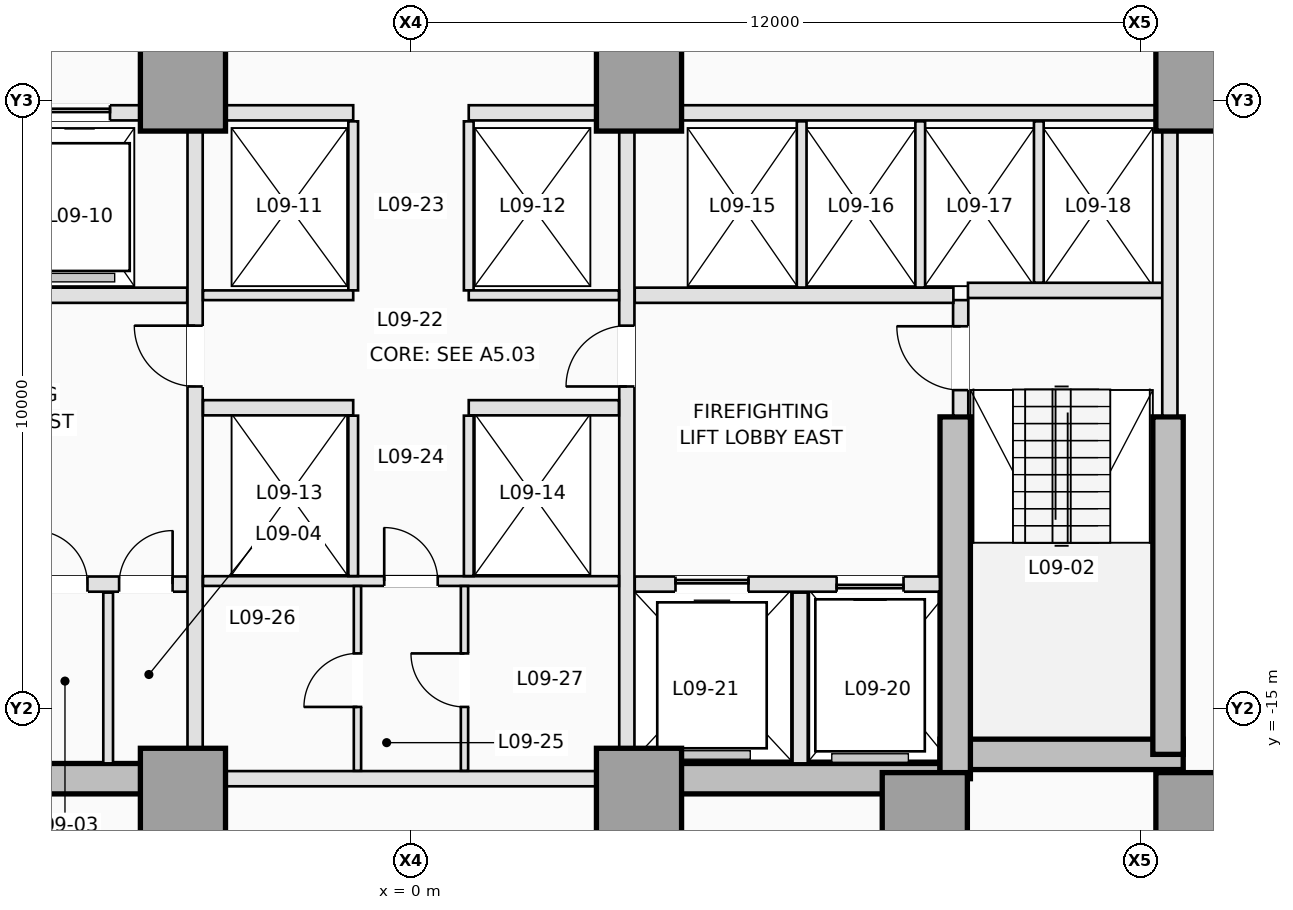
"""IFC4 building model, lengths in metres.
Left out: names, types, materials, properties, quantities, classifications, styles, units other than length and angle.
Written with IfcOpenShell. Run it as: python <this file> out.ifc"""

import sys

from ifc_helpers import new_model, si_unit, direction, frame, frame_2d, origin, origin_2d, place, context, subcontext, project, spatial, rectangle, extrude, element, fill, save


model = new_model("IFC4")
c1 = context("Model", 3, precision=1e-05, world=origin(), true_north=direction((0.0, 1.0)))
c2 = subcontext(c1, "Body", "Model", "MODEL_VIEW")
j1 = project(units=[si_unit("LENGTHUNIT", "METRE"), si_unit("PLANEANGLEUNIT", "RADIAN")], contexts=[c1])
p1 = place(None, origin())
s1 = spatial("IfcSite", under=j1, at=p1, CompositionType="ELEMENT")
p2 = place(p1, origin())
s2 = spatial("IfcBuilding", under=s1, at=p2, CompositionType="ELEMENT")
p3 = place(p2, frame((0.0, 0.0, 38.1)))
s3 = spatial("IfcBuildingStorey", under=s2, at=p3, CompositionType="ELEMENT", Elevation=38.1)
for number, where, z_axis, x_axis in (
    (1, (-8.95, -16.15, 0.0), (0.0, 0.0, 1.0), (1.0, 0.0, 0.0)),
    (2, (3.75, -16.15, 0.0), (0.0, 0.0, 1.0), (1.0, 0.0, 0.0)),
):
    element("IfcWall", number, at=place(p3, frame(where, z_axis=z_axis, x_axis=x_axis)), inside=s3, PredefinedType="SHEAR", context=c2, shape_type="SweptSolid", body=[
        extrude(rectangle(XDim=5.2, YDim=0.5, at=frame_2d((2.6, 0.0))), origin(), (0.0, 0.0, 1.0), 3.5),
    ])
p4 = place(p3, frame((8.7, -15.75, 0.0), z_axis=(0.0, 0.0, 1.0), x_axis=(1.0, 0.0, 0.0)))
e3 = element("IfcWall", 3, at=p4, inside=s3, PredefinedType="SHEAR", context=c2, shape_type="SweptSolid", body=[
    extrude(rectangle(XDim=4.0, YDim=0.5, at=frame_2d((2.0, 0.0))), origin(), (0.0, 0.0, 1.0), 3.5),
])
p5 = place(p3, frame((12.45, -15.75, 0.0), z_axis=(0.0, 0.0, 1.0), x_axis=(0.0, 1.0, 0.0)))
e4 = element("IfcWall", 4, at=p5, inside=s3, PredefinedType="SHEAR", context=c2, shape_type="SweptSolid", body=[
    extrude(rectangle(XDim=5.55, YDim=0.5, at=frame_2d((2.775, 0.0))), origin(), (0.0, 0.0, 1.0), 3.5),
])
p6 = place(p3, frame((8.95, -16.15, 0.0), z_axis=(0.0, 0.0, 1.0), x_axis=(0.0, 1.0, 0.0)))
e5 = element("IfcWall", 5, at=p6, inside=s3, PredefinedType="SHEAR", context=c2, shape_type="SweptSolid", body=[
    extrude(rectangle(XDim=5.95, YDim=0.5, at=frame_2d((2.975, 0.0))), origin(), (0.0, 0.0, 1.0), 3.5),
])
for number, where, z_axis, x_axis in (
    (6, (-3.75, -16.35, 0.0), (0.0, 0.0, 1.0), (1.0, 0.0, 0.0)),
    (7, (3.75, -16.35, 0.0), (0.0, 0.0, 1.0), (1.0, 0.0, 0.0)),
    (8, (8.45, -16.75, 0.0), (0.0, 0.0, 1.0), (1.0, 0.0, 0.0)),
    (9, (12.95, -16.75, 0.0), (0.0, 0.0, 1.0), (1.0, 0.0, 0.0)),
    (10, (-3.75, -4.8, 0.0), (0.0, 0.0, 1.0), (1.0, 0.0, 0.0)),
    (11, (3.75, -4.8, 0.0), (0.0, 0.0, 1.0), (1.0, 0.0, 0.0)),
    (12, (12.95, -4.8, 0.0), (0.0, 0.0, 1.0), (1.0, 0.0, 0.0)),
):
    element("IfcColumn", number, at=place(p3, frame(where, z_axis=z_axis, x_axis=x_axis)), inside=s3, PredefinedType="COLUMN", context=c2, shape_type="SweptSolid", body=[
        extrude(rectangle(XDim=1.4, YDim=1.4, at=origin_2d()), origin(), (0.0, 0.0, 1.0), 3.5),
    ])
p7 = place(p3, frame((9.04, -10.18, 0.0), z_axis=(0.0, 0.0, 1.0), x_axis=(0.0, 1.0, 0.0)))
e13 = element("IfcWall", 13, at=p7, inside=s3, PredefinedType="PARTITIONING", context=c2, shape_type="SweptSolid", body=[
    extrude(rectangle(XDim=1.9, YDim=0.25, at=frame_2d((0.95, 0.0))), origin(), (0.0, 0.0, 1.0), 3.25),
])
p8 = place(p7, frame((0.42, 0.0, 0.0)))
e14 = element("IfcOpeningElement", 14, at=p8, cuts=e13, PredefinedType="OPENING", context=c2, shape_type="SweptSolid", body=[
    extrude(rectangle(XDim=1.05, YDim=2.15, at=frame_2d((0.525, 1.075))), frame((0.0, 0.135, 0.0), z_axis=(0.0, -1.0, 0.0), x_axis=(1.0, 0.0, 0.0)), (0.0, 0.0, 1.0), 0.27),
])
p9 = place(p3, frame((9.16, -8.12, 0.0), z_axis=(0.0, 0.0, 1.0), x_axis=(1.0, 0.0, 0.0)))
e15 = element("IfcWall", 15, at=p9, inside=s3, PredefinedType="PARTITIONING", context=c2, shape_type="SweptSolid", body=[
    extrude(rectangle(XDim=3.22, YDim=0.25, at=frame_2d((1.61, 0.0))), origin(), (0.0, 0.0, 1.0), 3.25),
])
p10 = place(p3, frame((12.48, -10.18, 0.0), z_axis=(0.0, 0.0, 1.0), x_axis=(0.0, 1.0, 0.0)))
e16 = element("IfcWall", 16, at=p10, inside=s3, PredefinedType="PARTITIONING", context=c2, shape_type="SweptSolid", body=[
    extrude(rectangle(XDim=4.678, YDim=0.25, at=frame_2d((2.339, 0.0))), origin(), (0.0, 0.0, 1.0), 3.25),
])
p11 = place(p3, frame((-8.698, -12.95, 0.0), z_axis=(0.0, 0.0, 1.0), x_axis=(1.0, 0.0, 0.0)))
e17 = element("IfcWall", 17, at=p11, inside=s3, PredefinedType="PARTITIONING", context=c2, shape_type="SweptSolid", body=[
    extrude(rectangle(XDim=5.018, YDim=0.25, at=frame_2d((2.509, 0.0))), origin(), (0.0, 0.0, 1.0), 3.25),
])
p12 = place(p11, frame((0.598, 0.0, 0.0)))
e18 = element("IfcOpeningElement", 18, at=p12, cuts=e17, PredefinedType="OPENING", context=c2, shape_type="SweptSolid", body=[
    extrude(rectangle(XDim=1.1, YDim=2.15, at=frame_2d((0.55, 1.075))), frame((0.0, 0.135, 0.0), z_axis=(0.0, -1.0, 0.0), x_axis=(1.0, 0.0, 0.0)), (0.0, 0.0, 1.0), 0.27),
])
p13 = place(p11, frame((2.498, 0.0, 0.0)))
e19 = element("IfcOpeningElement", 19, at=p13, cuts=e17, PredefinedType="OPENING", context=c2, shape_type="SweptSolid", body=[
    extrude(rectangle(XDim=0.88, YDim=2.1, at=frame_2d((0.44, 1.05))), frame((0.0, 0.135, 0.0), z_axis=(0.0, -1.0, 0.0), x_axis=(1.0, 0.0, 0.0)), (0.0, 0.0, 1.0), 0.27),
])
p14 = place(p11, frame((3.898, 0.0, 0.0)))
e20 = element("IfcOpeningElement", 20, at=p14, cuts=e17, PredefinedType="OPENING", context=c2, shape_type="SweptSolid", body=[
    extrude(rectangle(XDim=0.88, YDim=2.1, at=frame_2d((0.44, 1.05))), frame((0.0, 0.135, 0.0), z_axis=(0.0, -1.0, 0.0), x_axis=(1.0, 0.0, 0.0)), (0.0, 0.0, 1.0), 0.27),
])
p15 = place(p3, frame((3.68, -12.95, 0.0), z_axis=(0.0, 0.0, 1.0), x_axis=(1.0, 0.0, 0.0)))
e21 = element("IfcWall", 21, at=p15, inside=s3, PredefinedType="PARTITIONING", context=c2, shape_type="SweptSolid", body=[
    extrude(rectangle(XDim=5.018, YDim=0.25, at=frame_2d((2.509, 0.0))), origin(), (0.0, 0.0, 1.0), 3.25),
])
p16 = place(p15, frame((3.32, 0.0, 0.0)))
e22 = element("IfcOpeningElement", 22, at=p16, cuts=e21, PredefinedType="OPENING", context=c2, shape_type="SweptSolid", body=[
    extrude(rectangle(XDim=1.1, YDim=2.15, at=frame_2d((0.55, 1.075))), frame((0.0, 0.135, 0.0), z_axis=(0.0, -1.0, 0.0), x_axis=(1.0, 0.0, 0.0)), (0.0, 0.0, 1.0), 0.27),
])
p17 = place(p15, frame((0.67, 0.0, 0.0)))
e23 = element("IfcOpeningElement", 23, at=p17, cuts=e21, PredefinedType="OPENING", context=c2, shape_type="SweptSolid", body=[
    extrude(rectangle(XDim=1.2, YDim=2.15, at=frame_2d((0.6, 1.075))), frame((0.0, 0.135, 0.0), z_axis=(0.0, -1.0, 0.0), x_axis=(1.0, 0.0, 0.0)), (0.0, 0.0, 1.0), 0.27),
])
p18 = place(p3, frame((-4.98, -15.898, 0.0), z_axis=(0.0, 0.0, 1.0), x_axis=(0.0, 1.0, 0.0)))
e24 = element("IfcWall", 24, at=p18, inside=s3, PredefinedType="PARTITIONING", context=c2, shape_type="SweptSolid", body=[
    extrude(rectangle(XDim=2.808, YDim=0.16, at=frame_2d((1.404, 0.0))), origin(), (0.0, 0.0, 1.0), 3.25),
])
p19 = place(p3, frame((6.4, -15.898, 0.0), z_axis=(0.0, 0.0, 1.0), x_axis=(0.0, 1.0, 0.0)))
e25 = element("IfcWall", 25, at=p19, inside=s3, PredefinedType="PARTITIONING", context=c2, shape_type="SweptSolid", body=[
    extrude(rectangle(XDim=2.808, YDim=0.25, at=frame_2d((1.404, 0.0))), origin(), (0.0, 0.0, 1.0), 3.25),
])
for number, where, z_axis, x_axis in (
    (26, (-8.92, -8.2, 0.0), (0.0, 0.0, 1.0), (1.0, 0.0, 0.0)),
    (27, (3.68, -8.2, 0.0), (0.0, 0.0, 1.0), (1.0, 0.0, 0.0)),
):
    element("IfcWall", number, at=place(p3, frame(where, z_axis=z_axis, x_axis=x_axis)), inside=s3, PredefinedType="PARTITIONING", context=c2, shape_type="SweptSolid", body=[
        extrude(rectangle(XDim=5.24, YDim=0.25, at=frame_2d((2.62, 0.0))), origin(), (0.0, 0.0, 1.0), 3.25),
    ])
p20 = place(p3, frame((-3.55, -15.648, 0.0), z_axis=(0.0, 0.0, 1.0), x_axis=(0.0, 1.0, 0.0)))
e28 = element("IfcWall", 28, at=p20, inside=s3, PredefinedType="PARTITIONING", context=c2, shape_type="SweptSolid", body=[
    extrude(rectangle(XDim=10.146, YDim=0.25, at=frame_2d((5.073, 0.0))), origin(), (0.0, 0.0, 1.0), 3.25),
])
p21 = place(p20, frame((5.948, 0.0, 0.0)))
e29 = element("IfcOpeningElement", 29, at=p21, cuts=e28, PredefinedType="OPENING", context=c2, shape_type="SweptSolid", body=[
    extrude(rectangle(XDim=1.0, YDim=2.15, at=frame_2d((0.5, 1.075))), frame((0.0, 0.135, 0.0), z_axis=(0.0, -1.0, 0.0), x_axis=(1.0, 0.0, 0.0)), (0.0, 0.0, 1.0), 0.27),
])
p22 = place(p3, frame((3.55, -15.648, 0.0), z_axis=(0.0, 0.0, 1.0), x_axis=(0.0, 1.0, 0.0)))
e30 = element("IfcWall", 30, at=p22, inside=s3, PredefinedType="PARTITIONING", context=c2, shape_type="SweptSolid", body=[
    extrude(rectangle(XDim=10.146, YDim=0.25, at=frame_2d((5.073, 0.0))), origin(), (0.0, 0.0, 1.0), 3.25),
])
p23 = place(p22, frame((5.948, 0.0, 0.0)))
e31 = element("IfcOpeningElement", 31, at=p23, cuts=e30, PredefinedType="OPENING", context=c2, shape_type="SweptSolid", body=[
    extrude(rectangle(XDim=1.0, YDim=2.15, at=frame_2d((0.5, 1.075))), frame((0.0, 0.135, 0.0), z_axis=(0.0, -1.0, 0.0), x_axis=(1.0, 0.0, 0.0)), (0.0, 0.0, 1.0), 0.27),
])
p24 = place(p3, frame((-12.248, -5.2, 0.0), z_axis=(0.0, 0.0, 1.0), x_axis=(1.0, 0.0, 0.0)))
e32 = element("IfcWall", 32, at=p24, inside=s3, PredefinedType="PARTITIONING", context=c2, shape_type="SweptSolid", body=[
    extrude(rectangle(XDim=7.796, YDim=0.25, at=frame_2d((3.898, 0.0))), origin(), (0.0, 0.0, 1.0), 3.25),
])
p25 = place(p24, frame((0.448, 0.0, 0.0)))
e33 = element("IfcOpeningElement", 33, at=p25, cuts=e32, PredefinedType="OPENING", context=c2, shape_type="SweptSolid", body=[
    extrude(rectangle(XDim=1.0, YDim=2.15, at=frame_2d((0.5, 1.075))), frame((0.0, 0.135, 0.0), z_axis=(0.0, -1.0, 0.0), x_axis=(1.0, 0.0, 0.0)), (0.0, 0.0, 1.0), 0.27),
])
p26 = place(p24, frame((2.398, 0.0, 0.0)))
e34 = element("IfcOpeningElement", 34, at=p26, cuts=e32, PredefinedType="OPENING", context=c2, shape_type="SweptSolid", body=[
    extrude(rectangle(XDim=1.0, YDim=2.15, at=frame_2d((0.5, 1.075))), frame((0.0, 0.135, 0.0), z_axis=(0.0, -1.0, 0.0), x_axis=(1.0, 0.0, 0.0)), (0.0, 0.0, 1.0), 0.27),
])
p27 = place(p24, frame((4.348, 0.0, 0.0)))
e35 = element("IfcOpeningElement", 35, at=p27, cuts=e32, PredefinedType="OPENING", context=c2, shape_type="SweptSolid", body=[
    extrude(rectangle(XDim=1.0, YDim=2.15, at=frame_2d((0.5, 1.075))), frame((0.0, 0.135, 0.0), z_axis=(0.0, -1.0, 0.0), x_axis=(1.0, 0.0, 0.0)), (0.0, 0.0, 1.0), 0.27),
])
p28 = place(p24, frame((6.298, 0.0, 0.0)))
e36 = element("IfcOpeningElement", 36, at=p28, cuts=e32, PredefinedType="OPENING", context=c2, shape_type="SweptSolid", body=[
    extrude(rectangle(XDim=1.0, YDim=2.15, at=frame_2d((0.5, 1.075))), frame((0.0, 0.135, 0.0), z_axis=(0.0, -1.0, 0.0), x_axis=(1.0, 0.0, 0.0)), (0.0, 0.0, 1.0), 0.27),
])
p29 = place(p3, frame((4.452, -5.2, 0.0), z_axis=(0.0, 0.0, 1.0), x_axis=(1.0, 0.0, 0.0)))
e37 = element("IfcWall", 37, at=p29, inside=s3, PredefinedType="PARTITIONING", context=c2, shape_type="SweptSolid", body=[
    extrude(rectangle(XDim=7.796, YDim=0.25, at=frame_2d((3.898, 0.0))), origin(), (0.0, 0.0, 1.0), 3.25),
])
for number, where, z_axis, x_axis in (
    (38, (-3.048, -5.2, 0.0), (0.0, 0.0, 1.0), (1.0, 0.0, 0.0)),
    (39, (0.95, -5.2, 0.0), (0.0, 0.0, 1.0), (1.0, 0.0, 0.0)),
):
    element("IfcWall", number, at=place(p3, frame(where, z_axis=z_axis, x_axis=x_axis)), inside=s3, PredefinedType="PARTITIONING", context=c2, shape_type="SweptSolid", body=[
        extrude(rectangle(XDim=2.098, YDim=0.25, at=frame_2d((1.049, 0.0))), origin(), (0.0, 0.0, 1.0), 3.25),
    ])
for number, where, z_axis, x_axis in (
    (40, (6.425, -8.073, 0.0), (0.0, 0.0, 1.0), (0.0, 1.0, 0.0)),
    (41, (8.375, -8.073, 0.0), (0.0, 0.0, 1.0), (0.0, 1.0, 0.0)),
):
    element("IfcWall", number, at=place(p3, frame(where, z_axis=z_axis, x_axis=x_axis)), inside=s3, PredefinedType="PARTITIONING", context=c2, shape_type="SweptSolid", body=[
        extrude(rectangle(XDim=2.733, YDim=0.16, at=frame_2d((1.366, 0.0))), origin(), (0.0, 0.0, 1.0), 3.25),
    ])
p30 = place(p3, frame((10.325, -7.993, 0.0), z_axis=(0.0, 0.0, 1.0), x_axis=(0.0, 1.0, 0.0)))
e42 = element("IfcWall", 42, at=p30, inside=s3, PredefinedType="PARTITIONING", context=c2, shape_type="SweptSolid", body=[
    extrude(rectangle(XDim=2.653, YDim=0.16, at=frame_2d((1.326, 0.0))), origin(), (0.0, 0.0, 1.0), 3.25),
])
p31 = place(p3, frame((-3.048, -16.15, 0.0), z_axis=(0.0, 0.0, 1.0), x_axis=(1.0, 0.0, 0.0)))
e43 = element("IfcWall", 43, at=p31, inside=s3, PredefinedType="PARTITIONING", context=c2, shape_type="SweptSolid", body=[
    extrude(rectangle(XDim=6.096, YDim=0.25, at=frame_2d((3.048, 0.0))), origin(), (0.0, 0.0, 1.0), 2.3),
])
for number, where, z_axis, x_axis in (
    (44, (-0.95, -8.12, 0.0), (0.0, 0.0, 1.0), (0.0, 1.0, 0.0)),
    (45, (0.95, -8.12, 0.0), (0.0, 0.0, 1.0), (0.0, 1.0, 0.0)),
):
    element("IfcWall", number, at=place(p3, frame(where, z_axis=z_axis, x_axis=x_axis)), inside=s3, PredefinedType="PARTITIONING", context=c2, shape_type="SweptSolid", body=[
        extrude(rectangle(XDim=2.78, YDim=0.16, at=frame_2d((1.39, 0.0))), origin(), (0.0, 0.0, 1.0), 3.25),
    ])
for number, where, z_axis, x_axis in (
    (46, (-3.42, -8.2, 0.0), (0.0, 0.0, 1.0), (1.0, 0.0, 0.0)),
    (47, (0.95, -8.2, 0.0), (0.0, 0.0, 1.0), (1.0, 0.0, 0.0)),
):
    element("IfcWall", number, at=place(p3, frame(where, z_axis=z_axis, x_axis=x_axis)), inside=s3, PredefinedType="PARTITIONING", context=c2, shape_type="SweptSolid", body=[
        extrude(rectangle(XDim=2.47, YDim=0.16, at=frame_2d((1.235, 0.0))), origin(), (0.0, 0.0, 1.0), 3.25),
    ])
for number, where, z_axis, x_axis in (
    (48, (-3.42, -10.05, 0.0), (0.0, 0.0, 1.0), (1.0, 0.0, 0.0)),
    (49, (0.95, -10.05, 0.0), (0.0, 0.0, 1.0), (1.0, 0.0, 0.0)),
):
    element("IfcWall", number, at=place(p3, frame(where, z_axis=z_axis, x_axis=x_axis)), inside=s3, PredefinedType="PARTITIONING", context=c2, shape_type="SweptSolid", body=[
        extrude(rectangle(XDim=2.47, YDim=0.25, at=frame_2d((1.235, 0.0))), origin(), (0.0, 0.0, 1.0), 3.25),
    ])
p32 = place(p3, frame((-3.42, -12.9, 0.0), z_axis=(0.0, 0.0, 1.0), x_axis=(1.0, 0.0, 0.0)))
e50 = element("IfcWall", 50, at=p32, inside=s3, PredefinedType="PARTITIONING", context=c2, shape_type="SweptSolid", body=[
    extrude(rectangle(XDim=6.84, YDim=0.16, at=frame_2d((3.42, 0.0))), origin(), (0.0, 0.0, 1.0), 3.25),
])
p33 = place(p32, frame((2.98, 0.0, 0.0)))
e51 = element("IfcOpeningElement", 51, at=p33, cuts=e50, PredefinedType="OPENING", context=c2, shape_type="SweptSolid", body=[
    extrude(rectangle(XDim=0.88, YDim=2.12, at=frame_2d((0.44, 1.06))), frame((0.0, 0.09, 0.0), z_axis=(0.0, -1.0, 0.0), x_axis=(1.0, 0.0, 0.0)), (0.0, 0.0, 1.0), 0.18),
])
for number, where, z_axis, x_axis in (
    (52, (-0.95, -12.818, 0.0), (0.0, 0.0, 1.0), (0.0, 1.0, 0.0)),
    (53, (0.95, -12.818, 0.0), (0.0, 0.0, 1.0), (0.0, 1.0, 0.0)),
):
    element("IfcWall", number, at=place(p3, frame(where, z_axis=z_axis, x_axis=x_axis)), inside=s3, PredefinedType="PARTITIONING", context=c2, shape_type="SweptSolid", body=[
        extrude(rectangle(XDim=2.638, YDim=0.16, at=frame_2d((1.319, 0.0))), origin(), (0.0, 0.0, 1.0), 3.25),
    ])
p34 = place(p3, frame((-0.88, -16.02, 0.0), z_axis=(0.0, 0.0, 1.0), x_axis=(0.0, 1.0, 0.0)))
e54 = element("IfcWall", 54, at=p34, inside=s3, PredefinedType="PARTITIONING", context=c2, shape_type="SweptSolid", body=[
    extrude(rectangle(XDim=3.038, YDim=0.12, at=frame_2d((1.519, 0.0))), origin(), (0.0, 0.0, 1.0), 3.25),
])
p35 = place(p34, frame((1.05, 0.0, 0.0)))
e55 = element("IfcOpeningElement", 55, at=p35, cuts=e54, PredefinedType="OPENING", context=c2, shape_type="SweptSolid", body=[
    extrude(rectangle(XDim=0.88, YDim=2.12, at=frame_2d((0.44, 1.06))), frame((0.0, 0.07, 0.0), z_axis=(0.0, -1.0, 0.0), x_axis=(1.0, 0.0, 0.0)), (0.0, 0.0, 1.0), 0.14),
])
p36 = place(p3, frame((0.88, -16.02, 0.0), z_axis=(0.0, 0.0, 1.0), x_axis=(0.0, 1.0, 0.0)))
e56 = element("IfcWall", 56, at=p36, inside=s3, PredefinedType="PARTITIONING", context=c2, shape_type="SweptSolid", body=[
    extrude(rectangle(XDim=3.038, YDim=0.12, at=frame_2d((1.519, 0.0))), origin(), (0.0, 0.0, 1.0), 3.25),
])
p37 = place(p36, frame((1.05, 0.0, 0.0)))
e57 = element("IfcOpeningElement", 57, at=p37, cuts=e56, PredefinedType="OPENING", context=c2, shape_type="SweptSolid", body=[
    extrude(rectangle(XDim=0.88, YDim=2.12, at=frame_2d((0.44, 1.06))), frame((0.0, 0.07, 0.0), z_axis=(0.0, -1.0, 0.0), x_axis=(1.0, 0.0, 0.0)), (0.0, 0.0, 1.0), 0.14),
])
p38 = place(p28, origin())
e58 = element("IfcDoor", 58, at=p38, inside=s3, OperationType="SLIDING_TO_LEFT", PredefinedType="DOOR", context=c2, shape_type="SweptSolid", body=[
    extrude(rectangle(XDim=1.0, YDim=2.15, at=frame_2d((0.5, 1.075))), frame((0.0, 0.025, 0.0), z_axis=(0.0, -1.0, 0.0), x_axis=(1.0, 0.0, 0.0)), (0.0, 0.0, 1.0), 0.05),
])
fill(e36, e58)
p39 = place(p16, origin())
e59 = element("IfcDoor", 59, at=p39, inside=s3, OperationType="SLIDING_TO_RIGHT", PredefinedType="DOOR", context=c2, shape_type="SweptSolid", body=[
    extrude(rectangle(XDim=1.1, YDim=2.15, at=frame_2d((0.55, 1.075))), frame((0.0, 0.025, 0.0), z_axis=(0.0, -1.0, 0.0), x_axis=(1.0, 0.0, 0.0)), (0.0, 0.0, 1.0), 0.05),
])
fill(e22, e59)
p40 = place(p17, origin())
e60 = element("IfcDoor", 60, at=p40, inside=s3, OperationType="SLIDING_TO_LEFT", PredefinedType="DOOR", context=c2, shape_type="SweptSolid", body=[
    extrude(rectangle(XDim=1.2, YDim=2.15, at=frame_2d((0.6, 1.075))), frame((0.0, 0.025, 0.0), z_axis=(0.0, -1.0, 0.0), x_axis=(1.0, 0.0, 0.0)), (0.0, 0.0, 1.0), 0.05),
])
fill(e23, e60)
p41 = place(p8, origin())
e61 = element("IfcDoor", 61, at=p41, inside=s3, OperationType="SINGLE_SWING_RIGHT", PredefinedType="DOOR", context=c2, shape_type="SweptSolid", body=[
    extrude(rectangle(XDim=1.05, YDim=2.15, at=frame_2d((0.525, 1.075))), frame((0.0, 0.025, 0.0), z_axis=(0.0, -1.0, 0.0), x_axis=(1.0, 0.0, 0.0)), (0.0, 0.0, 1.0), 0.05),
])
fill(e14, e61)
p42 = place(p13, origin())
e62 = element("IfcDoor", 62, at=p42, inside=s3, OperationType="SINGLE_SWING_LEFT", PredefinedType="TRAPDOOR", context=c2, shape_type="SweptSolid", body=[
    extrude(rectangle(XDim=0.88, YDim=2.1, at=frame_2d((0.44, 1.05))), frame((0.0, 0.025, 0.0), z_axis=(0.0, -1.0, 0.0), x_axis=(1.0, 0.0, 0.0)), (0.0, 0.0, 1.0), 0.05),
])
fill(e19, e62)
p43 = place(p14, origin())
e63 = element("IfcDoor", 63, at=p43, inside=s3, OperationType="SINGLE_SWING_RIGHT", PredefinedType="TRAPDOOR", context=c2, shape_type="SweptSolid", body=[
    extrude(rectangle(XDim=0.88, YDim=2.1, at=frame_2d((0.44, 1.05))), frame((0.0, 0.025, 0.0), z_axis=(0.0, -1.0, 0.0), x_axis=(1.0, 0.0, 0.0)), (0.0, 0.0, 1.0), 0.05),
])
fill(e20, e63)
p44 = place(p21, origin())
e64 = element("IfcDoor", 64, at=p44, inside=s3, OperationType="SINGLE_SWING_RIGHT", PredefinedType="DOOR", context=c2, shape_type="SweptSolid", body=[
    extrude(rectangle(XDim=1.0, YDim=2.15, at=frame_2d((0.5, 1.075))), frame((0.0, 0.025, 0.0), z_axis=(0.0, -1.0, 0.0), x_axis=(1.0, 0.0, 0.0)), (0.0, 0.0, 1.0), 0.05),
])
fill(e29, e64)
p45 = place(p23, origin())
e65 = element("IfcDoor", 65, at=p45, inside=s3, OperationType="SINGLE_SWING_LEFT", PredefinedType="DOOR", context=c2, shape_type="SweptSolid", body=[
    extrude(rectangle(XDim=1.0, YDim=2.15, at=frame_2d((0.5, 1.075))), frame((0.0, 0.025, 0.0), z_axis=(0.0, -1.0, 0.0), x_axis=(1.0, 0.0, 0.0)), (0.0, 0.0, 1.0), 0.05),
])
fill(e31, e65)
p46 = place(p33, origin())
e66 = element("IfcDoor", 66, at=p46, inside=s3, OperationType="SINGLE_SWING_LEFT", PredefinedType="DOOR", context=c2, shape_type="SweptSolid", body=[
    extrude(rectangle(XDim=0.88, YDim=2.12, at=frame_2d((0.44, 1.06))), frame((0.0, 0.025, 0.0), z_axis=(0.0, -1.0, 0.0), x_axis=(1.0, 0.0, 0.0)), (0.0, 0.0, 1.0), 0.05),
])
fill(e51, e66)
p47 = place(p35, origin())
e67 = element("IfcDoor", 67, at=p47, inside=s3, OperationType="SINGLE_SWING_LEFT", PredefinedType="DOOR", context=c2, shape_type="SweptSolid", body=[
    extrude(rectangle(XDim=0.88, YDim=2.12, at=frame_2d((0.44, 1.06))), frame((0.0, 0.025, 0.0), z_axis=(0.0, -1.0, 0.0), x_axis=(1.0, 0.0, 0.0)), (0.0, 0.0, 1.0), 0.05),
])
fill(e55, e67)
p48 = place(p37, origin())
e68 = element("IfcDoor", 68, at=p48, inside=s3, OperationType="SINGLE_SWING_RIGHT", PredefinedType="DOOR", context=c2, shape_type="SweptSolid", body=[
    extrude(rectangle(XDim=0.88, YDim=2.12, at=frame_2d((0.44, 1.06))), frame((0.0, 0.025, 0.0), z_axis=(0.0, -1.0, 0.0), x_axis=(1.0, 0.0, 0.0)), (0.0, 0.0, 1.0), 0.05),
])
fill(e57, e68)
save(model, sys.argv[1])
